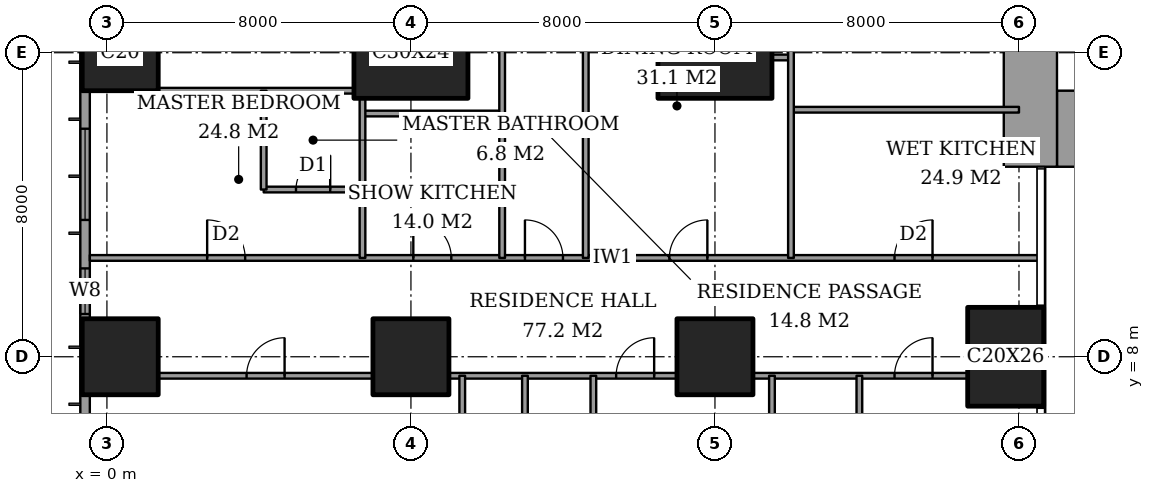
"""IFC4 building model, lengths in metres.
Left out: names, types, materials, properties, quantities, classifications, styles, units other than length and angle.
Written with IfcOpenShell. Run it as: python <this file> out.ifc"""

import sys

from ifc_helpers import new_model, si_unit, direction, frame, frame_2d, origin, origin_2d, place, context, subcontext, project, spatial, rectangle, extrude, element, fill, save


model = new_model("IFC4")
c1 = context("Model", 3, precision=1e-05, world=origin(), true_north=direction((0.0, 1.0)))
c2 = subcontext(c1, "Body", "Model", "MODEL_VIEW")
j1 = project(units=[si_unit("LENGTHUNIT", "METRE"), si_unit("PLANEANGLEUNIT", "RADIAN")], contexts=[c1])
p1 = place(None, origin())
s1 = spatial("IfcSite", under=j1, at=p1, CompositionType="ELEMENT")
p2 = place(p1, origin())
s2 = spatial("IfcBuilding", under=s1, at=p2, CompositionType="ELEMENT")
p3 = place(p2, frame((0.0, 0.0, 29.6)))
s3 = spatial("IfcBuildingStorey", under=s2, at=p3, CompositionType="ELEMENT", Elevation=29.6)
for number, where, z_axis, x_axis in (
    (1, (0.35, 8.0, 0.0), (0.0, 0.0, 1.0), (1.0, 0.0, 0.0)),
    (2, (0.35, 16.0, 0.0), (0.0, 0.0, 1.0), (1.0, 0.0, 0.0)),
    (3, (8.0, 8.0, 0.0), (0.0, 0.0, 1.0), (1.0, 0.0, 0.0)),
):
    element("IfcColumn", number, at=place(p3, frame(where, z_axis=z_axis, x_axis=x_axis)), inside=s3, PredefinedType="COLUMN", context=c2, shape_type="SweptSolid", body=[
        extrude(rectangle(XDim=2.0, YDim=2.0, at=origin_2d()), origin(), (0.0, 0.0, 1.0), 3.6),
    ])
p4 = place(p3, frame((8.0, 16.0, 0.0), z_axis=(0.0, 0.0, 1.0), x_axis=(1.0, 0.0, 0.0)))
e4 = element("IfcColumn", 4, at=p4, inside=s3, PredefinedType="COLUMN", context=c2, shape_type="SweptSolid", body=[
    extrude(rectangle(XDim=3.0, YDim=2.4, at=origin_2d()), origin(), (0.0, 0.0, 1.0), 3.6),
])
p5 = place(p3, frame((16.0, 8.0, 0.0), z_axis=(0.0, 0.0, 1.0), x_axis=(1.0, 0.0, 0.0)))
e5 = element("IfcColumn", 5, at=p5, inside=s3, PredefinedType="COLUMN", context=c2, shape_type="SweptSolid", body=[
    extrude(rectangle(XDim=2.0, YDim=2.0, at=origin_2d()), origin(), (0.0, 0.0, 1.0), 3.6),
])
p6 = place(p3, frame((16.0, 16.0, 0.0), z_axis=(0.0, 0.0, 1.0), x_axis=(1.0, 0.0, 0.0)))
e6 = element("IfcColumn", 6, at=p6, inside=s3, PredefinedType="COLUMN", context=c2, shape_type="SweptSolid", body=[
    extrude(rectangle(XDim=3.0, YDim=2.4, at=origin_2d()), origin(), (0.0, 0.0, 1.0), 3.6),
])
p7 = place(p3, frame((23.65, 8.0, 0.0), z_axis=(0.0, 0.0, 1.0), x_axis=(1.0, 0.0, 0.0)))
e7 = element("IfcColumn", 7, at=p7, inside=s3, PredefinedType="COLUMN", context=c2, shape_type="SweptSolid", body=[
    extrude(rectangle(XDim=2.0, YDim=2.6, at=origin_2d()), origin(), (0.0, 0.0, 1.0), 3.6),
])
p8 = place(p3, frame((25.0, 14.0, 0.0), z_axis=(0.0, 0.0, 1.0), x_axis=(1.0, 0.0, 0.0)))
e8 = element("IfcWall", 8, at=p8, inside=s3, PredefinedType="SHEAR", context=c2, shape_type="SweptSolid", body=[
    extrude(rectangle(XDim=3.15, YDim=2.0, at=frame_2d((1.575, 0.0))), origin(), (0.0, 0.0, 1.0), 3.6),
])
p9 = place(p3, frame((24.3, 13.0, 0.0), z_axis=(0.0, 0.0, 1.0), x_axis=(0.0, 1.0, 0.0)))
e9 = element("IfcWall", 9, at=p9, inside=s3, PredefinedType="SHEAR", context=c2, shape_type="SweptSolid", body=[
    extrude(rectangle(XDim=10.15, YDim=1.4, at=frame_2d((5.075, 0.0))), origin(), (0.0, 0.0, 1.0), 3.6),
])
p10 = place(p3, frame((-0.575, 44.825, 0.0), z_axis=(0.0, 0.0, 1.0), x_axis=(0.0, -1.0, 0.0)))
e10 = element("IfcWall", 10, at=p10, inside=s3, PredefinedType="SOLIDWALL", context=c2, shape_type="SweptSolid", body=[
    extrude(rectangle(XDim=41.65, YDim=0.25, at=frame_2d((20.825, 0.0))), origin(), (0.0, 0.0, 1.0), 3.6),
])
p11 = place(p10, frame((0.775, 0.0, 0.6)))
e11 = element("IfcOpeningElement", 11, at=p11, cuts=e10, PredefinedType="OPENING", context=c2, shape_type="SweptSolid", body=[
    extrude(rectangle(XDim=2.4, YDim=2.0, at=frame_2d((1.2, 1.0))), frame((0.0, 0.135, 0.0), z_axis=(0.0, -1.0, 0.0), x_axis=(1.0, 0.0, 0.0)), (0.0, 0.0, 1.0), 0.27),
])
p12 = place(p10, frame((6.225, 0.0, 0.6)))
e12 = element("IfcOpeningElement", 12, at=p12, cuts=e10, PredefinedType="OPENING", context=c2, shape_type="SweptSolid", body=[
    extrude(rectangle(XDim=1.2, YDim=2.0, at=frame_2d((0.6, 1.0))), frame((0.0, 0.135, 0.0), z_axis=(0.0, -1.0, 0.0), x_axis=(1.0, 0.0, 0.0)), (0.0, 0.0, 1.0), 0.27),
])
p13 = place(p10, frame((8.625, 0.0, 0.6)))
e13 = element("IfcOpeningElement", 13, at=p13, cuts=e10, PredefinedType="OPENING", context=c2, shape_type="SweptSolid", body=[
    extrude(rectangle(XDim=2.4, YDim=2.0, at=frame_2d((1.2, 1.0))), frame((0.0, 0.135, 0.0), z_axis=(0.0, -1.0, 0.0), x_axis=(1.0, 0.0, 0.0)), (0.0, 0.0, 1.0), 0.27),
])
p14 = place(p10, frame((15.625, 0.0, 0.6)))
e14 = element("IfcOpeningElement", 14, at=p14, cuts=e10, PredefinedType="OPENING", context=c2, shape_type="SweptSolid", body=[
    extrude(rectangle(XDim=2.4, YDim=2.0, at=frame_2d((1.2, 1.0))), frame((0.0, 0.135, 0.0), z_axis=(0.0, -1.0, 0.0), x_axis=(1.0, 0.0, 0.0)), (0.0, 0.0, 1.0), 0.27),
])
p15 = place(p10, frame((23.625, 0.0, 0.6)))
e15 = element("IfcOpeningElement", 15, at=p15, cuts=e10, PredefinedType="OPENING", context=c2, shape_type="SweptSolid", body=[
    extrude(rectangle(XDim=2.4, YDim=2.0, at=frame_2d((1.2, 1.0))), frame((0.0, 0.135, 0.0), z_axis=(0.0, -1.0, 0.0), x_axis=(1.0, 0.0, 0.0)), (0.0, 0.0, 1.0), 0.27),
])
p16 = place(p10, frame((30.825, 0.0, 0.6)))
e16 = element("IfcOpeningElement", 16, at=p16, cuts=e10, PredefinedType="OPENING", context=c2, shape_type="SweptSolid", body=[
    extrude(rectangle(XDim=2.4, YDim=2.0, at=frame_2d((1.2, 1.0))), frame((0.0, 0.135, 0.0), z_axis=(0.0, -1.0, 0.0), x_axis=(1.0, 0.0, 0.0)), (0.0, 0.0, 1.0), 0.27),
])
p17 = place(p10, frame((34.5, 0.0, 0.6)))
e17 = element("IfcOpeningElement", 17, at=p17, cuts=e10, PredefinedType="OPENING", context=c2, shape_type="SweptSolid", body=[
    extrude(rectangle(XDim=1.2, YDim=2.0, at=frame_2d((0.6, 1.0))), frame((0.0, 0.135, 0.0), z_axis=(0.0, -1.0, 0.0), x_axis=(1.0, 0.0, 0.0)), (0.0, 0.0, 1.0), 0.27),
])
p18 = place(p10, frame((38.475, 0.0, 0.6)))
e18 = element("IfcOpeningElement", 18, at=p18, cuts=e10, PredefinedType="OPENING", context=c2, shape_type="SweptSolid", body=[
    extrude(rectangle(XDim=2.4, YDim=2.0, at=frame_2d((1.2, 1.0))), frame((0.0, 0.135, 0.0), z_axis=(0.0, -1.0, 0.0), x_axis=(1.0, 0.0, 0.0)), (0.0, 0.0, 1.0), 0.27),
])
p19 = place(p3, frame((1.35, 7.5, 0.0), z_axis=(0.0, 0.0, 1.0), x_axis=(1.0, 0.0, 0.0)))
e19 = element("IfcWall", 19, at=p19, inside=s3, PredefinedType="PARTITIONING", context=c2, shape_type="SweptSolid", body=[
    extrude(rectangle(XDim=5.65, YDim=0.15, at=frame_2d((2.825, 0.0))), origin(), (0.0, 0.0, 1.0), 3.35),
])
p20 = place(p19, frame((2.325, 0.0, 0.0)))
e20 = element("IfcOpeningElement", 20, at=p20, cuts=e19, PredefinedType="OPENING", context=c2, shape_type="SweptSolid", body=[
    extrude(rectangle(XDim=1.0, YDim=2.1, at=frame_2d((0.5, 1.05))), frame((0.0, 0.085, 0.0), z_axis=(0.0, -1.0, 0.0), x_axis=(1.0, 0.0, 0.0)), (0.0, 0.0, 1.0), 0.17),
])
p21 = place(p3, frame((9.0, 7.5, 0.0), z_axis=(0.0, 0.0, 1.0), x_axis=(1.0, 0.0, 0.0)))
e21 = element("IfcWall", 21, at=p21, inside=s3, PredefinedType="PARTITIONING", context=c2, shape_type="SweptSolid", body=[
    extrude(rectangle(XDim=6.0, YDim=0.15, at=frame_2d((3.0, 0.0))), origin(), (0.0, 0.0, 1.0), 3.35),
])
p22 = place(p21, frame((4.4, 0.0, 0.0)))
e22 = element("IfcOpeningElement", 22, at=p22, cuts=e21, PredefinedType="OPENING", context=c2, shape_type="SweptSolid", body=[
    extrude(rectangle(XDim=1.0, YDim=2.1, at=frame_2d((0.5, 1.05))), frame((0.0, 0.085, 0.0), z_axis=(0.0, -1.0, 0.0), x_axis=(1.0, 0.0, 0.0)), (0.0, 0.0, 1.0), 0.17),
])
p23 = place(p3, frame((17.0, 7.5, 0.0), z_axis=(0.0, 0.0, 1.0), x_axis=(1.0, 0.0, 0.0)))
e23 = element("IfcWall", 23, at=p23, inside=s3, PredefinedType="PARTITIONING", context=c2, shape_type="SweptSolid", body=[
    extrude(rectangle(XDim=5.65, YDim=0.15, at=frame_2d((2.825, 0.0))), origin(), (0.0, 0.0, 1.0), 3.35),
])
p24 = place(p23, frame((3.725, 0.0, 0.0)))
e24 = element("IfcOpeningElement", 24, at=p24, cuts=e23, PredefinedType="OPENING", context=c2, shape_type="SweptSolid", body=[
    extrude(rectangle(XDim=1.0, YDim=2.1, at=frame_2d((0.5, 1.05))), frame((0.0, 0.085, 0.0), z_axis=(0.0, -1.0, 0.0), x_axis=(1.0, 0.0, 0.0)), (0.0, 0.0, 1.0), 0.17),
])
p25 = place(p3, frame((-0.45, 10.6, 0.0), z_axis=(0.0, 0.0, 1.0), x_axis=(1.0, 0.0, 0.0)))
e25 = element("IfcWall", 25, at=p25, inside=s3, PredefinedType="PARTITIONING", context=c2, shape_type="SweptSolid", body=[
    extrude(rectangle(XDim=25.011, YDim=0.15, at=frame_2d((12.505, 0.0))), origin(), (0.0, 0.0, 1.0), 3.35),
])
p26 = place(p25, frame((11.45, 0.0, 0.0)))
e26 = element("IfcOpeningElement", 26, at=p26, cuts=e25, PredefinedType="OPENING", context=c2, shape_type="SweptSolid", body=[
    extrude(rectangle(XDim=1.0, YDim=2.1, at=frame_2d((0.5, 1.05))), frame((0.0, 0.085, 0.0), z_axis=(0.0, -1.0, 0.0), x_axis=(1.0, 0.0, 0.0)), (0.0, 0.0, 1.0), 0.17),
])
p27 = place(p25, frame((3.087, 0.0, 0.0)))
e27 = element("IfcOpeningElement", 27, at=p27, cuts=e25, PredefinedType="OPENING", context=c2, shape_type="SweptSolid", body=[
    extrude(rectangle(XDim=1.0, YDim=2.1, at=frame_2d((0.5, 1.05))), frame((0.0, 0.085, 0.0), z_axis=(0.0, -1.0, 0.0), x_axis=(1.0, 0.0, 0.0)), (0.0, 0.0, 1.0), 0.17),
])
p28 = place(p25, frame((8.512, 0.0, 0.0)))
e28 = element("IfcOpeningElement", 28, at=p28, cuts=e25, PredefinedType="OPENING", context=c2, shape_type="SweptSolid", body=[
    extrude(rectangle(XDim=1.0, YDim=2.1, at=frame_2d((0.5, 1.05))), frame((0.0, 0.085, 0.0), z_axis=(0.0, -1.0, 0.0), x_axis=(1.0, 0.0, 0.0)), (0.0, 0.0, 1.0), 0.17),
])
p29 = place(p25, frame((15.25, 0.0, 0.0)))
e29 = element("IfcOpeningElement", 29, at=p29, cuts=e25, PredefinedType="OPENING", context=c2, shape_type="SweptSolid", body=[
    extrude(rectangle(XDim=1.0, YDim=2.1, at=frame_2d((0.5, 1.05))), frame((0.0, 0.085, 0.0), z_axis=(0.0, -1.0, 0.0), x_axis=(1.0, 0.0, 0.0)), (0.0, 0.0, 1.0), 0.17),
])
p30 = place(p25, frame((21.175, 0.0, 0.0)))
e30 = element("IfcOpeningElement", 30, at=p30, cuts=e25, PredefinedType="OPENING", context=c2, shape_type="SweptSolid", body=[
    extrude(rectangle(XDim=1.0, YDim=2.1, at=frame_2d((0.5, 1.05))), frame((0.0, 0.085, 0.0), z_axis=(0.0, -1.0, 0.0), x_axis=(1.0, 0.0, 0.0)), (0.0, 0.0, 1.0), 0.17),
])
p31 = place(p3, frame((4.125, 12.4, 0.0), z_axis=(0.0, 0.0, 1.0), x_axis=(1.0, 0.0, 0.0)))
e31 = element("IfcWall", 31, at=p31, inside=s3, PredefinedType="PARTITIONING", context=c2, shape_type="SweptSolid", body=[
    extrude(rectangle(XDim=2.6, YDim=0.15, at=frame_2d((1.3, 0.0))), origin(), (0.0, 0.0, 1.0), 3.35),
])
p32 = place(p31, frame((0.85, 0.0, 0.0)))
e32 = element("IfcOpeningElement", 32, at=p32, cuts=e31, PredefinedType="OPENING", context=c2, shape_type="SweptSolid", body=[
    extrude(rectangle(XDim=0.9, YDim=2.1, at=frame_2d((0.45, 1.05))), frame((0.0, 0.085, 0.0), z_axis=(0.0, -1.0, 0.0), x_axis=(1.0, 0.0, 0.0)), (0.0, 0.0, 1.0), 0.17),
])
p33 = place(p3, frame((6.725, 14.4, 0.0), z_axis=(0.0, 0.0, 1.0), x_axis=(1.0, 0.0, 0.0)))
e33 = element("IfcWall", 33, at=p33, inside=s3, PredefinedType="PARTITIONING", context=c2, shape_type="SweptSolid", body=[
    extrude(rectangle(XDim=3.675, YDim=0.15, at=frame_2d((1.837, 0.0))), origin(), (0.0, 0.0, 1.0), 3.35),
])
p34 = place(p3, frame((18.0, 14.5, 0.0), z_axis=(0.0, 0.0, 1.0), x_axis=(1.0, 0.0, 0.0)))
e34 = element("IfcWall", 34, at=p34, inside=s3, PredefinedType="PARTITIONING", context=c2, shape_type="SweptSolid", body=[
    extrude(rectangle(XDim=6.0, YDim=0.15, at=frame_2d((3.0, 0.0))), origin(), (0.0, 0.0, 1.0), 3.35),
])
p35 = place(p3, frame((1.35, 15.0, 0.0), z_axis=(0.0, 0.0, 1.0), x_axis=(1.0, 0.0, 0.0)))
e35 = element("IfcWall", 35, at=p35, inside=s3, PredefinedType="PARTITIONING", context=c2, shape_type="SweptSolid", body=[
    extrude(rectangle(XDim=5.15, YDim=0.15, at=frame_2d((2.575, 0.0))), origin(), (0.0, 0.0, 1.0), 3.35),
])
p36 = place(p3, frame((17.5, 15.875, 0.0), z_axis=(0.0, 0.0, 1.0), x_axis=(1.0, 0.0, 0.0)))
e36 = element("IfcWall", 36, at=p36, inside=s3, PredefinedType="PARTITIONING", context=c2, shape_type="SweptSolid", body=[
    extrude(rectangle(XDim=0.5, YDim=0.15, at=frame_2d((0.25, 0.0))), origin(), (0.0, 0.0, 1.0), 2.634),
])
p37 = place(p3, frame((4.125, 12.4, 0.0), z_axis=(0.0, 0.0, 1.0), x_axis=(0.0, 1.0, 0.0)))
e37 = element("IfcWall", 37, at=p37, inside=s3, PredefinedType="PARTITIONING", context=c2, shape_type="SweptSolid", body=[
    extrude(rectangle(XDim=2.6, YDim=0.15, at=frame_2d((1.3, 0.0))), origin(), (0.0, 0.0, 1.0), 3.35),
])
p38 = place(p3, frame((6.725, 10.6, 0.0), z_axis=(0.0, 0.0, 1.0), x_axis=(0.0, 1.0, 0.0)))
e38 = element("IfcWall", 38, at=p38, inside=s3, PredefinedType="PARTITIONING", context=c2, shape_type="SweptSolid", body=[
    extrude(rectangle(XDim=4.2, YDim=0.15, at=frame_2d((2.1, 0.0))), origin(), (0.0, 0.0, 1.0), 3.35),
])
p39 = place(p3, frame((9.35, -0.45, 0.0), z_axis=(0.0, 0.0, 1.0), x_axis=(0.0, 1.0, 0.0)))
e39 = element("IfcWall", 39, at=p39, inside=s3, PredefinedType="PARTITIONING", context=c2, shape_type="SweptSolid", body=[
    extrude(rectangle(XDim=7.95, YDim=0.15, at=frame_2d((3.975, 0.0))), origin(), (0.0, 0.0, 1.0), 3.35),
])
p40 = place(p39, frame((3.525, 0.0, 0.0)))
e40 = element("IfcOpeningElement", 40, at=p40, cuts=e39, PredefinedType="OPENING", context=c2, shape_type="SweptSolid", body=[
    extrude(rectangle(XDim=0.9, YDim=2.1, at=frame_2d((0.45, 1.05))), frame((0.0, 0.085, 0.0), z_axis=(0.0, -1.0, 0.0), x_axis=(1.0, 0.0, 0.0)), (0.0, 0.0, 1.0), 0.17),
])
p41 = place(p3, frame((10.4, 10.6, 0.0), z_axis=(0.0, 0.0, 1.0), x_axis=(0.0, 1.0, 0.0)))
e41 = element("IfcWall", 41, at=p41, inside=s3, PredefinedType="PARTITIONING", context=c2, shape_type="SweptSolid", body=[
    extrude(rectangle(XDim=11.0, YDim=0.15, at=frame_2d((5.5, 0.0))), origin(), (0.0, 0.0, 1.0), 3.35),
])
p42 = place(p41, frame((8.363, 0.0, 0.0)))
e42 = element("IfcOpeningElement", 42, at=p42, cuts=e41, PredefinedType="OPENING", context=c2, shape_type="SweptSolid", body=[
    extrude(rectangle(XDim=1.0, YDim=2.1, at=frame_2d((0.5, 1.05))), frame((0.0, 0.085, 0.0), z_axis=(0.0, -1.0, 0.0), x_axis=(1.0, 0.0, 0.0)), (0.0, 0.0, 1.0), 0.17),
])
p43 = place(p3, frame((11.0, -0.45, 0.0), z_axis=(0.0, 0.0, 1.0), x_axis=(0.0, 1.0, 0.0)))
e43 = element("IfcWall", 43, at=p43, inside=s3, PredefinedType="PARTITIONING", context=c2, shape_type="SweptSolid", body=[
    extrude(rectangle(XDim=7.95, YDim=0.15, at=frame_2d((3.975, 0.0))), origin(), (0.0, 0.0, 1.0), 3.35),
])
p44 = place(p3, frame((12.6, 10.6, 0.0), z_axis=(0.0, 0.0, 1.0), x_axis=(0.0, 1.0, 0.0)))
e44 = element("IfcWall", 44, at=p44, inside=s3, PredefinedType="PARTITIONING", context=c2, shape_type="SweptSolid", body=[
    extrude(rectangle(XDim=6.725, YDim=0.15, at=frame_2d((3.362, 0.0))), origin(), (0.0, 0.0, 1.0), 3.35),
])
p45 = place(p3, frame((12.8, -0.45, 0.0), z_axis=(0.0, 0.0, 1.0), x_axis=(0.0, 1.0, 0.0)))
e45 = element("IfcWall", 45, at=p45, inside=s3, PredefinedType="PARTITIONING", context=c2, shape_type="SweptSolid", body=[
    extrude(rectangle(XDim=7.95, YDim=0.15, at=frame_2d((3.975, 0.0))), origin(), (0.0, 0.0, 1.0), 3.35),
])
p46 = place(p45, frame((3.525, 0.0, 0.0)))
e46 = element("IfcOpeningElement", 46, at=p46, cuts=e45, PredefinedType="OPENING", context=c2, shape_type="SweptSolid", body=[
    extrude(rectangle(XDim=0.9, YDim=2.1, at=frame_2d((0.45, 1.05))), frame((0.0, 0.085, 0.0), z_axis=(0.0, -1.0, 0.0), x_axis=(1.0, 0.0, 0.0)), (0.0, 0.0, 1.0), 0.17),
])
p47 = place(p3, frame((14.4, 15.875, 0.0), z_axis=(0.0, 0.0, 1.0), x_axis=(0.0, 1.0, 0.0)))
e47 = element("IfcWall", 47, at=p47, inside=s3, PredefinedType="PARTITIONING", context=c2, shape_type="SweptSolid", body=[
    extrude(rectangle(XDim=1.45, YDim=0.15, at=frame_2d((0.725, 0.0))), origin(), (0.0, 0.0, 1.0), 3.35),
])
p48 = place(p3, frame((17.5, -0.45, 0.0), z_axis=(0.0, 0.0, 1.0), x_axis=(0.0, 1.0, 0.0)))
e48 = element("IfcWall", 48, at=p48, inside=s3, PredefinedType="PARTITIONING", context=c2, shape_type="SweptSolid", body=[
    extrude(rectangle(XDim=7.95, YDim=0.15, at=frame_2d((3.975, 0.0))), origin(), (0.0, 0.0, 1.0), 3.35),
])
p49 = place(p3, frame((18.0, 10.6, 0.0), z_axis=(0.0, 0.0, 1.0), x_axis=(0.0, 1.0, 0.0)))
e49 = element("IfcWall", 49, at=p49, inside=s3, PredefinedType="PARTITIONING", context=c2, shape_type="SweptSolid", body=[
    extrude(rectangle(XDim=6.725, YDim=0.15, at=frame_2d((3.362, 0.0))), origin(), (0.0, 0.0, 1.0), 3.35),
])
p50 = place(p3, frame((19.8, -0.45, 0.0), z_axis=(0.0, 0.0, 1.0), x_axis=(0.0, 1.0, 0.0)))
e50 = element("IfcWall", 50, at=p50, inside=s3, PredefinedType="PARTITIONING", context=c2, shape_type="SweptSolid", body=[
    extrude(rectangle(XDim=7.95, YDim=0.15, at=frame_2d((3.975, 0.0))), origin(), (0.0, 0.0, 1.0), 3.35),
])
p51 = place(p50, frame((3.525, 0.0, 0.0)))
e51 = element("IfcOpeningElement", 51, at=p51, cuts=e50, PredefinedType="OPENING", context=c2, shape_type="SweptSolid", body=[
    extrude(rectangle(XDim=0.9, YDim=2.1, at=frame_2d((0.45, 1.05))), frame((0.0, 0.085, 0.0), z_axis=(0.0, -1.0, 0.0), x_axis=(1.0, 0.0, 0.0)), (0.0, 0.0, 1.0), 0.17),
])
p52 = place(p16, origin())
e52 = element("IfcWindow", 52, at=p52, inside=s3, PartitioningType="SINGLE_PANEL", PredefinedType="WINDOW", context=c2, shape_type="SweptSolid", body=[
    extrude(rectangle(XDim=2.4, YDim=2.0, at=frame_2d((1.2, 1.0))), frame((0.0, 0.03, 0.0), z_axis=(0.0, -1.0, 0.0), x_axis=(1.0, 0.0, 0.0)), (0.0, 0.0, 1.0), 0.06),
])
fill(e16, e52)
p53 = place(p17, origin())
e53 = element("IfcWindow", 53, at=p53, inside=s3, PartitioningType="SINGLE_PANEL", PredefinedType="WINDOW", context=c2, shape_type="SweptSolid", body=[
    extrude(rectangle(XDim=1.2, YDim=2.0, at=frame_2d((0.6, 1.0))), frame((0.0, 0.03, 0.0), z_axis=(0.0, -1.0, 0.0), x_axis=(1.0, 0.0, 0.0)), (0.0, 0.0, 1.0), 0.06),
])
fill(e17, e53)
p54 = place(p20, origin())
e54 = element("IfcDoor", 54, at=p54, inside=s3, OperationType="SINGLE_SWING_LEFT", PredefinedType="DOOR", context=c2, shape_type="SweptSolid", body=[
    extrude(rectangle(XDim=1.0, YDim=2.1, at=frame_2d((0.5, 1.05))), frame((0.0, 0.025, 0.0), z_axis=(0.0, -1.0, 0.0), x_axis=(1.0, 0.0, 0.0)), (0.0, 0.0, 1.0), 0.05),
])
fill(e20, e54)
p55 = place(p22, origin())
e55 = element("IfcDoor", 55, at=p55, inside=s3, OperationType="SINGLE_SWING_LEFT", PredefinedType="DOOR", context=c2, shape_type="SweptSolid", body=[
    extrude(rectangle(XDim=1.0, YDim=2.1, at=frame_2d((0.5, 1.05))), frame((0.0, 0.025, 0.0), z_axis=(0.0, -1.0, 0.0), x_axis=(1.0, 0.0, 0.0)), (0.0, 0.0, 1.0), 0.05),
])
fill(e22, e55)
p56 = place(p24, origin())
e56 = element("IfcDoor", 56, at=p56, inside=s3, OperationType="SINGLE_SWING_LEFT", PredefinedType="DOOR", context=c2, shape_type="SweptSolid", body=[
    extrude(rectangle(XDim=1.0, YDim=2.1, at=frame_2d((0.5, 1.05))), frame((0.0, 0.025, 0.0), z_axis=(0.0, -1.0, 0.0), x_axis=(1.0, 0.0, 0.0)), (0.0, 0.0, 1.0), 0.05),
])
fill(e24, e56)
p57 = place(p26, origin())
e57 = element("IfcDoor", 57, at=p57, inside=s3, OperationType="SINGLE_SWING_RIGHT", PredefinedType="DOOR", context=c2, shape_type="SweptSolid", body=[
    extrude(rectangle(XDim=1.0, YDim=2.1, at=frame_2d((0.5, 1.05))), frame((0.0, 0.025, 0.0), z_axis=(0.0, -1.0, 0.0), x_axis=(1.0, 0.0, 0.0)), (0.0, 0.0, 1.0), 0.05),
])
fill(e26, e57)
p58 = place(p32, origin())
e58 = element("IfcDoor", 58, at=p58, inside=s3, OperationType="SINGLE_SWING_LEFT", PredefinedType="DOOR", context=c2, shape_type="SweptSolid", body=[
    extrude(rectangle(XDim=0.9, YDim=2.1, at=frame_2d((0.45, 1.05))), frame((0.0, 0.025, 0.0), z_axis=(0.0, -1.0, 0.0), x_axis=(1.0, 0.0, 0.0)), (0.0, 0.0, 1.0), 0.05),
])
fill(e32, e58)
p59 = place(p27, origin())
e59 = element("IfcDoor", 59, at=p59, inside=s3, OperationType="SINGLE_SWING_RIGHT", PredefinedType="DOOR", context=c2, shape_type="SweptSolid", body=[
    extrude(rectangle(XDim=1.0, YDim=2.1, at=frame_2d((0.5, 1.05))), frame((0.0, 0.025, 0.0), z_axis=(0.0, -1.0, 0.0), x_axis=(1.0, 0.0, 0.0)), (0.0, 0.0, 1.0), 0.05),
])
fill(e27, e59)
p60 = place(p28, origin())
e60 = element("IfcDoor", 60, at=p60, inside=s3, OperationType="SINGLE_SWING_RIGHT", PredefinedType="DOOR", context=c2, shape_type="SweptSolid", body=[
    extrude(rectangle(XDim=1.0, YDim=2.1, at=frame_2d((0.5, 1.05))), frame((0.0, 0.025, 0.0), z_axis=(0.0, -1.0, 0.0), x_axis=(1.0, 0.0, 0.0)), (0.0, 0.0, 1.0), 0.05),
])
fill(e28, e60)
p61 = place(p29, origin())
e61 = element("IfcDoor", 61, at=p61, inside=s3, OperationType="SINGLE_SWING_LEFT", PredefinedType="DOOR", context=c2, shape_type="SweptSolid", body=[
    extrude(rectangle(XDim=1.0, YDim=2.1, at=frame_2d((0.5, 1.05))), frame((0.0, 0.025, 0.0), z_axis=(0.0, -1.0, 0.0), x_axis=(1.0, 0.0, 0.0)), (0.0, 0.0, 1.0), 0.05),
])
fill(e29, e61)
p62 = place(p30, origin())
e62 = element("IfcDoor", 62, at=p62, inside=s3, OperationType="SINGLE_SWING_LEFT", PredefinedType="DOOR", context=c2, shape_type="SweptSolid", body=[
    extrude(rectangle(XDim=1.0, YDim=2.1, at=frame_2d((0.5, 1.05))), frame((0.0, 0.025, 0.0), z_axis=(0.0, -1.0, 0.0), x_axis=(1.0, 0.0, 0.0)), (0.0, 0.0, 1.0), 0.05),
])
fill(e30, e62)
save(model, sys.argv[1])
